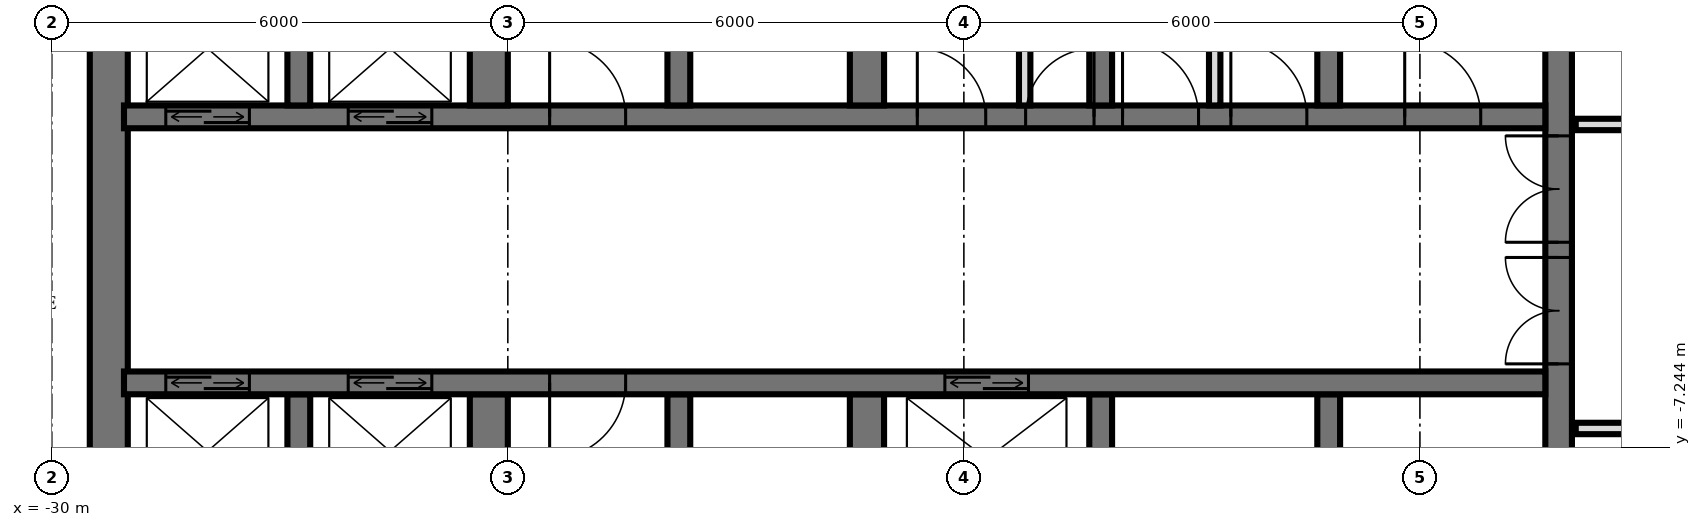
"""IFC4 building model, lengths in metres.
Left out: names, types, materials, properties, quantities, classifications, styles, units other than length and angle.
Written with IfcOpenShell. Run it as: python <this file> out.ifc"""

import sys

from ifc_helpers import new_model, si_unit, direction, frame, frame_2d, origin, place, context, subcontext, project, spatial, rectangle, extrude, element, fill, save


model = new_model("IFC4")
c1 = context("Model", 3, precision=1e-05, world=origin(), true_north=direction((0.0, 1.0)))
c2 = subcontext(c1, "Body", "Model", "MODEL_VIEW")
j1 = project(units=[si_unit("LENGTHUNIT", "METRE"), si_unit("PLANEANGLEUNIT", "RADIAN")], contexts=[c1])
p1 = place(None, origin())
s1 = spatial("IfcSite", under=j1, at=p1, CompositionType="ELEMENT")
p2 = place(p1, origin())
s2 = spatial("IfcBuilding", under=s1, at=p2, CompositionType="ELEMENT")
p3 = place(p2, frame((0.0, 0.0, 34.8)))
s3 = spatial("IfcBuildingStorey", under=s2, at=p3, CompositionType="ELEMENT", Elevation=34.8)
p4 = place(p3, frame((-10.175, -14.55, 0.0), z_axis=(0.0, 0.0, 1.0), x_axis=(0.0, 1.0, 0.0)))
e1 = element("IfcWall", 1, at=p4, inside=s3, PredefinedType="SHEAR", context=c2, shape_type="SweptSolid", body=[
    extrude(rectangle(XDim=14.1, YDim=0.35, at=frame_2d((7.05, 0.0))), origin(), (0.0, 0.0, 1.0), 3.6),
])
p5 = place(p4, frame((8.4, 0.0, 0.0)))
e2 = element("IfcOpeningElement", 2, at=p5, cuts=e1, PredefinedType="OPENING", context=c2, shape_type="SweptSolid", body=[
    extrude(rectangle(XDim=1.4, YDim=2.4, at=frame_2d((0.7, 1.2))), frame((0.0, 0.185, 0.0), z_axis=(0.0, -1.0, 0.0), x_axis=(1.0, 0.0, 0.0)), (0.0, 0.0, 1.0), 0.37),
])
p6 = place(p4, frame((10.0, 0.0, 0.0)))
e3 = element("IfcOpeningElement", 3, at=p6, cuts=e1, PredefinedType="OPENING", context=c2, shape_type="SweptSolid", body=[
    extrude(rectangle(XDim=1.4, YDim=2.4, at=frame_2d((0.7, 1.2))), frame((0.0, 0.185, 0.0), z_axis=(0.0, -1.0, 0.0), x_axis=(1.0, 0.0, 0.0)), (0.0, 0.0, 1.0), 0.37),
])
p7 = place(p4, frame((4.0, 0.0, 0.0)))
e4 = element("IfcOpeningElement", 4, at=p7, cuts=e1, PredefinedType="OPENING", context=c2, shape_type="SweptSolid", body=[
    extrude(rectangle(XDim=1.2, YDim=2.1, at=frame_2d((0.6, 1.05))), frame((0.0, 0.185, 0.0), z_axis=(0.0, -1.0, 0.0), x_axis=(1.0, 0.0, 0.0)), (0.0, 0.0, 1.0), 0.37),
])
p8 = place(p3, frame((-29.25, -14.55, 0.0), z_axis=(0.0, 0.0, 1.0), x_axis=(0.0, 1.0, 0.0)))
e5 = element("IfcWall", 5, at=p8, inside=s3, PredefinedType="SHEAR", context=c2, shape_type="SweptSolid", body=[
    extrude(rectangle(XDim=14.1, YDim=0.5, at=frame_2d((7.05, 0.0))), origin(), (0.0, 0.0, 1.0), 3.6),
])
p9 = place(p3, frame((-29.05, -2.9, 0.0), z_axis=(0.0, 0.0, 1.0), x_axis=(1.0, 0.0, 0.0)))
e6 = element("IfcWall", 6, at=p9, inside=s3, PredefinedType="SHEAR", context=c2, shape_type="SweptSolid", body=[
    extrude(rectangle(XDim=18.7, YDim=0.3, at=frame_2d((9.35, 0.0))), origin(), (0.0, 0.0, 1.0), 3.6),
])
p10 = place(p9, frame((2.95, 0.0, 0.0)))
e7 = element("IfcOpeningElement", 7, at=p10, cuts=e6, PredefinedType="OPENING", context=c2, shape_type="SweptSolid", body=[
    extrude(rectangle(XDim=1.1, YDim=2.1, at=frame_2d((0.55, 1.05))), frame((0.0, 0.16, 0.0), z_axis=(0.0, -1.0, 0.0), x_axis=(1.0, 0.0, 0.0)), (0.0, 0.0, 1.0), 0.32),
])
p11 = place(p9, frame((0.55, 0.0, 0.0)))
e8 = element("IfcOpeningElement", 8, at=p11, cuts=e6, PredefinedType="OPENING", context=c2, shape_type="SweptSolid", body=[
    extrude(rectangle(XDim=1.1, YDim=2.1, at=frame_2d((0.55, 1.05))), frame((0.0, 0.16, 0.0), z_axis=(0.0, -1.0, 0.0), x_axis=(1.0, 0.0, 0.0)), (0.0, 0.0, 1.0), 0.32),
])
p12 = place(p9, frame((11.863, 0.0, 0.0)))
e9 = element("IfcOpeningElement", 9, at=p12, cuts=e6, PredefinedType="OPENING", context=c2, shape_type="SweptSolid", body=[
    extrude(rectangle(XDim=0.9, YDim=2.1, at=frame_2d((0.45, 1.05))), frame((0.0, 0.16, 0.0), z_axis=(0.0, -1.0, 0.0), x_axis=(1.0, 0.0, 0.0)), (0.0, 0.0, 1.0), 0.32),
])
p13 = place(p9, frame((10.438, 0.0, 0.0)))
e10 = element("IfcOpeningElement", 10, at=p13, cuts=e6, PredefinedType="OPENING", context=c2, shape_type="SweptSolid", body=[
    extrude(rectangle(XDim=0.9, YDim=2.1, at=frame_2d((0.45, 1.05))), frame((0.0, 0.16, 0.0), z_axis=(0.0, -1.0, 0.0), x_axis=(1.0, 0.0, 0.0)), (0.0, 0.0, 1.0), 0.32),
])
p14 = place(p9, frame((16.85, 0.0, 0.0)))
e11 = element("IfcOpeningElement", 11, at=p14, cuts=e6, PredefinedType="OPENING", context=c2, shape_type="SweptSolid", body=[
    extrude(rectangle(XDim=1.0, YDim=2.1, at=frame_2d((0.5, 1.05))), frame((0.0, 0.16, 0.0), z_axis=(0.0, -1.0, 0.0), x_axis=(1.0, 0.0, 0.0)), (0.0, 0.0, 1.0), 0.32),
])
p15 = place(p9, frame((14.562, 0.0, 0.0)))
e12 = element("IfcOpeningElement", 12, at=p15, cuts=e6, PredefinedType="OPENING", context=c2, shape_type="SweptSolid", body=[
    extrude(rectangle(XDim=1.0, YDim=2.1, at=frame_2d((0.5, 1.05))), frame((0.0, 0.16, 0.0), z_axis=(0.0, -1.0, 0.0), x_axis=(1.0, 0.0, 0.0)), (0.0, 0.0, 1.0), 0.32),
])
p16 = place(p9, frame((13.137, 0.0, 0.0)))
e13 = element("IfcOpeningElement", 13, at=p16, cuts=e6, PredefinedType="OPENING", context=c2, shape_type="SweptSolid", body=[
    extrude(rectangle(XDim=1.0, YDim=2.1, at=frame_2d((0.5, 1.05))), frame((0.0, 0.16, 0.0), z_axis=(0.0, -1.0, 0.0), x_axis=(1.0, 0.0, 0.0)), (0.0, 0.0, 1.0), 0.32),
])
p17 = place(p9, frame((5.6, 0.0, 0.0)))
e14 = element("IfcOpeningElement", 14, at=p17, cuts=e6, PredefinedType="OPENING", context=c2, shape_type="SweptSolid", body=[
    extrude(rectangle(XDim=1.0, YDim=2.1, at=frame_2d((0.5, 1.05))), frame((0.0, 0.16, 0.0), z_axis=(0.0, -1.0, 0.0), x_axis=(1.0, 0.0, 0.0)), (0.0, 0.0, 1.0), 0.32),
])
p18 = place(p3, frame((-29.05, -6.4, 0.0), z_axis=(0.0, 0.0, 1.0), x_axis=(1.0, 0.0, 0.0)))
e15 = element("IfcWall", 15, at=p18, inside=s3, PredefinedType="SHEAR", context=c2, shape_type="SweptSolid", body=[
    extrude(rectangle(XDim=18.7, YDim=0.3, at=frame_2d((9.35, 0.0))), origin(), (0.0, 0.0, 1.0), 3.6),
])
p19 = place(p18, frame((2.95, 0.0, 0.0)))
e16 = element("IfcOpeningElement", 16, at=p19, cuts=e15, PredefinedType="OPENING", context=c2, shape_type="SweptSolid", body=[
    extrude(rectangle(XDim=1.1, YDim=2.1, at=frame_2d((0.55, 1.05))), frame((0.0, 0.16, 0.0), z_axis=(0.0, -1.0, 0.0), x_axis=(1.0, 0.0, 0.0)), (0.0, 0.0, 1.0), 0.32),
])
p20 = place(p18, frame((0.55, 0.0, 0.0)))
e17 = element("IfcOpeningElement", 17, at=p20, cuts=e15, PredefinedType="OPENING", context=c2, shape_type="SweptSolid", body=[
    extrude(rectangle(XDim=1.1, YDim=2.1, at=frame_2d((0.55, 1.05))), frame((0.0, 0.16, 0.0), z_axis=(0.0, -1.0, 0.0), x_axis=(1.0, 0.0, 0.0)), (0.0, 0.0, 1.0), 0.32),
])
p21 = place(p18, frame((10.8, 0.0, 0.0)))
e18 = element("IfcOpeningElement", 18, at=p21, cuts=e15, PredefinedType="OPENING", context=c2, shape_type="SweptSolid", body=[
    extrude(rectangle(XDim=1.1, YDim=2.1, at=frame_2d((0.55, 1.05))), frame((0.0, 0.16, 0.0), z_axis=(0.0, -1.0, 0.0), x_axis=(1.0, 0.0, 0.0)), (0.0, 0.0, 1.0), 0.32),
])
p22 = place(p18, frame((5.6, 0.0, 0.0)))
e19 = element("IfcOpeningElement", 19, at=p22, cuts=e15, PredefinedType="OPENING", context=c2, shape_type="SweptSolid", body=[
    extrude(rectangle(XDim=1.0, YDim=2.1, at=frame_2d((0.5, 1.05))), frame((0.0, 0.16, 0.0), z_axis=(0.0, -1.0, 0.0), x_axis=(1.0, 0.0, 0.0)), (0.0, 0.0, 1.0), 0.32),
])
for number, where, z_axis, x_axis in (
    (20, (-13.2, -2.75, 0.0), (0.0, 0.0, 1.0), (0.0, 1.0, 0.0)),
    (21, (-13.2, -8.85, 0.0), (0.0, 0.0, 1.0), (0.0, 1.0, 0.0)),
    (22, (-16.2, -2.75, 0.0), (0.0, 0.0, 1.0), (0.0, 1.0, 0.0)),
    (23, (-16.2, -8.85, 0.0), (0.0, 0.0, 1.0), (0.0, 1.0, 0.0)),
):
    element("IfcWall", number, at=place(p3, frame(where, z_axis=z_axis, x_axis=x_axis)), inside=s3, PredefinedType="SHEAR", context=c2, shape_type="SweptSolid", body=[
        extrude(rectangle(XDim=2.3, YDim=0.3, at=frame_2d((1.15, 0.0))), origin(), (0.0, 0.0, 1.0), 3.6),
    ])
for number, where, z_axis, x_axis in (
    (24, (-19.275, -2.75, 0.0), (0.0, 0.0, 1.0), (0.0, 1.0, 0.0)),
    (25, (-19.275, -8.85, 0.0), (0.0, 0.0, 1.0), (0.0, 1.0, 0.0)),
):
    element("IfcWall", number, at=place(p3, frame(where, z_axis=z_axis, x_axis=x_axis)), inside=s3, PredefinedType="SHEAR", context=c2, shape_type="SweptSolid", body=[
        extrude(rectangle(XDim=2.3, YDim=0.45, at=frame_2d((1.15, 0.0))), origin(), (0.0, 0.0, 1.0), 3.6),
    ])
for number, where, z_axis, x_axis in (
    (26, (-21.75, -2.75, 0.0), (0.0, 0.0, 1.0), (0.0, 1.0, 0.0)),
    (27, (-21.75, -8.85, 0.0), (0.0, 0.0, 1.0), (0.0, 1.0, 0.0)),
):
    element("IfcWall", number, at=place(p3, frame(where, z_axis=z_axis, x_axis=x_axis)), inside=s3, PredefinedType="SHEAR", context=c2, shape_type="SweptSolid", body=[
        extrude(rectangle(XDim=2.3, YDim=0.3, at=frame_2d((1.15, 0.0))), origin(), (0.0, 0.0, 1.0), 3.6),
    ])
for number, where, z_axis, x_axis in (
    (28, (-24.25, -2.75, 0.0), (0.0, 0.0, 1.0), (0.0, 1.0, 0.0)),
    (29, (-24.25, -8.85, 0.0), (0.0, 0.0, 1.0), (0.0, 1.0, 0.0)),
):
    element("IfcWall", number, at=place(p3, frame(where, z_axis=z_axis, x_axis=x_axis)), inside=s3, PredefinedType="SHEAR", context=c2, shape_type="SweptSolid", body=[
        extrude(rectangle(XDim=2.3, YDim=0.5, at=frame_2d((1.15, 0.0))), origin(), (0.0, 0.0, 1.0), 3.6),
    ])
for number, where, z_axis, x_axis in (
    (30, (-26.75, -2.75, 0.0), (0.0, 0.0, 1.0), (0.0, 1.0, 0.0)),
    (31, (-26.75, -8.85, 0.0), (0.0, 0.0, 1.0), (0.0, 1.0, 0.0)),
):
    element("IfcWall", number, at=place(p3, frame(where, z_axis=z_axis, x_axis=x_axis)), inside=s3, PredefinedType="SHEAR", context=c2, shape_type="SweptSolid", body=[
        extrude(rectangle(XDim=2.3, YDim=0.3, at=frame_2d((1.15, 0.0))), origin(), (0.0, 0.0, 1.0), 3.6),
    ])
for number, where, z_axis, x_axis in (
    (32, (-17.2, -2.75, 0.0), (0.0, 0.0, 1.0), (0.0, 1.0, 0.0)),
    (33, (-14.7, -2.75, 0.0), (0.0, 0.0, 1.0), (0.0, 1.0, 0.0)),
):
    element("IfcWall", number, at=place(p3, frame(where, z_axis=z_axis, x_axis=x_axis)), inside=s3, PredefinedType="PARTITIONING", context=c2, shape_type="SweptSolid", body=[
        extrude(rectangle(XDim=2.3, YDim=0.15, at=frame_2d((1.15, 0.0))), origin(), (0.0, 0.0, 1.0), 3.3),
    ])
p23 = place(p3, frame((-9.95, -7.0, 0.0), z_axis=(0.0, 0.0, 1.0), x_axis=(1.0, 0.0, 0.0)))
e34 = element("IfcWall", 34, at=p23, inside=s3, PredefinedType="PARTITIONING", context=c2, shape_type="SweptSolid", body=[
    extrude(rectangle(XDim=19.9, YDim=0.15, at=frame_2d((9.95, 0.0))), origin(), (0.0, 0.0, 1.0), 3.32),
])
p24 = place(p23, frame((9.45, 0.0, 0.0)))
e35 = element("IfcOpeningElement", 35, at=p24, cuts=e34, PredefinedType="OPENING", context=c2, shape_type="SweptSolid", body=[
    extrude(rectangle(XDim=1.0, YDim=2.1, at=frame_2d((0.5, 1.05))), frame((0.0, 0.085, 0.0), z_axis=(0.0, -1.0, 0.0), x_axis=(1.0, 0.0, 0.0)), (0.0, 0.0, 1.0), 0.17),
])
p25 = place(p23, frame((15.45, 0.0, 0.0)))
e36 = element("IfcOpeningElement", 36, at=p25, cuts=e34, PredefinedType="OPENING", context=c2, shape_type="SweptSolid", body=[
    extrude(rectangle(XDim=1.0, YDim=2.1, at=frame_2d((0.5, 1.05))), frame((0.0, 0.085, 0.0), z_axis=(0.0, -1.0, 0.0), x_axis=(1.0, 0.0, 0.0)), (0.0, 0.0, 1.0), 0.17),
])
p26 = place(p3, frame((-9.95, -3.0, 0.0), z_axis=(0.0, 0.0, 1.0), x_axis=(1.0, 0.0, 0.0)))
e37 = element("IfcWall", 37, at=p26, inside=s3, PredefinedType="PARTITIONING", context=c2, shape_type="SweptSolid", body=[
    extrude(rectangle(XDim=19.9, YDim=0.15, at=frame_2d((9.95, 0.0))), origin(), (0.0, 0.0, 1.0), 3.32),
])
p27 = place(p26, frame((1.7, 0.0, 0.0)))
e38 = element("IfcOpeningElement", 38, at=p27, cuts=e37, PredefinedType="OPENING", context=c2, shape_type="SweptSolid", body=[
    extrude(rectangle(XDim=1.0, YDim=2.1, at=frame_2d((0.5, 1.05))), frame((0.0, 0.085, 0.0), z_axis=(0.0, -1.0, 0.0), x_axis=(1.0, 0.0, 0.0)), (0.0, 0.0, 1.0), 0.17),
])
p28 = place(p26, frame((5.45, 0.0, 0.0)))
e39 = element("IfcOpeningElement", 39, at=p28, cuts=e37, PredefinedType="OPENING", context=c2, shape_type="SweptSolid", body=[
    extrude(rectangle(XDim=1.0, YDim=2.1, at=frame_2d((0.5, 1.05))), frame((0.0, 0.085, 0.0), z_axis=(0.0, -1.0, 0.0), x_axis=(1.0, 0.0, 0.0)), (0.0, 0.0, 1.0), 0.17),
])
p29 = place(p26, frame((8.2, 0.0, 0.0)))
e40 = element("IfcOpeningElement", 40, at=p29, cuts=e37, PredefinedType="OPENING", context=c2, shape_type="SweptSolid", body=[
    extrude(rectangle(XDim=1.0, YDim=2.1, at=frame_2d((0.5, 1.05))), frame((0.0, 0.085, 0.0), z_axis=(0.0, -1.0, 0.0), x_axis=(1.0, 0.0, 0.0)), (0.0, 0.0, 1.0), 0.17),
])
p30 = place(p26, frame((11.95, 0.0, 0.0)))
e41 = element("IfcOpeningElement", 41, at=p30, cuts=e37, PredefinedType="OPENING", context=c2, shape_type="SweptSolid", body=[
    extrude(rectangle(XDim=1.0, YDim=2.1, at=frame_2d((0.5, 1.05))), frame((0.0, 0.085, 0.0), z_axis=(0.0, -1.0, 0.0), x_axis=(1.0, 0.0, 0.0)), (0.0, 0.0, 1.0), 0.17),
])
p31 = place(p26, frame((16.95, 0.0, 0.0)))
e42 = element("IfcOpeningElement", 42, at=p31, cuts=e37, PredefinedType="OPENING", context=c2, shape_type="SweptSolid", body=[
    extrude(rectangle(XDim=1.0, YDim=2.1, at=frame_2d((0.5, 1.05))), frame((0.0, 0.085, 0.0), z_axis=(0.0, -1.0, 0.0), x_axis=(1.0, 0.0, 0.0)), (0.0, 0.0, 1.0), 0.17),
])
p32 = place(p10, origin())
e43 = element("IfcDoor", 43, at=p32, inside=s3, OperationType="DOUBLE_DOOR_SLIDING", PredefinedType="USERDEFINED", context=c2, shape_type="SweptSolid", body=[
    extrude(rectangle(XDim=1.1, YDim=2.1, at=frame_2d((0.55, 1.05))), frame((0.0, 0.025, 0.0), z_axis=(0.0, -1.0, 0.0), x_axis=(1.0, 0.0, 0.0)), (0.0, 0.0, 1.0), 0.05),
])
fill(e7, e43)
p33 = place(p11, origin())
e44 = element("IfcDoor", 44, at=p33, inside=s3, OperationType="DOUBLE_DOOR_SLIDING", PredefinedType="USERDEFINED", context=c2, shape_type="SweptSolid", body=[
    extrude(rectangle(XDim=1.1, YDim=2.1, at=frame_2d((0.55, 1.05))), frame((0.0, 0.025, 0.0), z_axis=(0.0, -1.0, 0.0), x_axis=(1.0, 0.0, 0.0)), (0.0, 0.0, 1.0), 0.05),
])
fill(e8, e44)
p34 = place(p19, origin())
e45 = element("IfcDoor", 45, at=p34, inside=s3, OperationType="DOUBLE_DOOR_SLIDING", PredefinedType="USERDEFINED", context=c2, shape_type="SweptSolid", body=[
    extrude(rectangle(XDim=1.1, YDim=2.1, at=frame_2d((0.55, 1.05))), frame((0.0, 0.025, 0.0), z_axis=(0.0, -1.0, 0.0), x_axis=(1.0, 0.0, 0.0)), (0.0, 0.0, 1.0), 0.05),
])
fill(e16, e45)
p35 = place(p20, origin())
e46 = element("IfcDoor", 46, at=p35, inside=s3, OperationType="DOUBLE_DOOR_SLIDING", PredefinedType="USERDEFINED", context=c2, shape_type="SweptSolid", body=[
    extrude(rectangle(XDim=1.1, YDim=2.1, at=frame_2d((0.55, 1.05))), frame((0.0, 0.025, 0.0), z_axis=(0.0, -1.0, 0.0), x_axis=(1.0, 0.0, 0.0)), (0.0, 0.0, 1.0), 0.05),
])
fill(e17, e46)
p36 = place(p21, origin())
e47 = element("IfcDoor", 47, at=p36, inside=s3, OperationType="DOUBLE_DOOR_SLIDING", PredefinedType="USERDEFINED", context=c2, shape_type="SweptSolid", body=[
    extrude(rectangle(XDim=1.1, YDim=2.1, at=frame_2d((0.55, 1.05))), frame((0.0, 0.025, 0.0), z_axis=(0.0, -1.0, 0.0), x_axis=(1.0, 0.0, 0.0)), (0.0, 0.0, 1.0), 0.05),
])
fill(e18, e47)
p37 = place(p5, origin())
e48 = element("IfcDoor", 48, at=p37, inside=s3, OperationType="DOUBLE_DOOR_SINGLE_SWING", PredefinedType="DOOR", context=c2, shape_type="SweptSolid", body=[
    extrude(rectangle(XDim=1.4, YDim=2.4, at=frame_2d((0.7, 1.2))), frame((0.0, 0.025, 0.0), z_axis=(0.0, -1.0, 0.0), x_axis=(1.0, 0.0, 0.0)), (0.0, 0.0, 1.0), 0.05),
])
fill(e2, e48)
p38 = place(p6, origin())
e49 = element("IfcDoor", 49, at=p38, inside=s3, OperationType="DOUBLE_DOOR_SINGLE_SWING", PredefinedType="DOOR", context=c2, shape_type="SweptSolid", body=[
    extrude(rectangle(XDim=1.4, YDim=2.4, at=frame_2d((0.7, 1.2))), frame((0.0, 0.025, 0.0), z_axis=(0.0, -1.0, 0.0), x_axis=(1.0, 0.0, 0.0)), (0.0, 0.0, 1.0), 0.05),
])
fill(e3, e49)
p39 = place(p12, origin())
e50 = element("IfcDoor", 50, at=p39, inside=s3, OperationType="SINGLE_SWING_LEFT", PredefinedType="DOOR", context=c2, shape_type="SweptSolid", body=[
    extrude(rectangle(XDim=0.9, YDim=2.1, at=frame_2d((0.45, 1.05))), frame((0.0, 0.025, 0.0), z_axis=(0.0, -1.0, 0.0), x_axis=(1.0, 0.0, 0.0)), (0.0, 0.0, 1.0), 0.05),
])
fill(e9, e50)
p40 = place(p13, origin())
e51 = element("IfcDoor", 51, at=p40, inside=s3, OperationType="SINGLE_SWING_RIGHT", PredefinedType="DOOR", context=c2, shape_type="SweptSolid", body=[
    extrude(rectangle(XDim=0.9, YDim=2.1, at=frame_2d((0.45, 1.05))), frame((0.0, 0.025, 0.0), z_axis=(0.0, -1.0, 0.0), x_axis=(1.0, 0.0, 0.0)), (0.0, 0.0, 1.0), 0.05),
])
fill(e10, e51)
p41 = place(p14, origin())
e52 = element("IfcDoor", 52, at=p41, inside=s3, OperationType="SINGLE_SWING_RIGHT", PredefinedType="DOOR", context=c2, shape_type="SweptSolid", body=[
    extrude(rectangle(XDim=1.0, YDim=2.1, at=frame_2d((0.5, 1.05))), frame((0.0, 0.025, 0.0), z_axis=(0.0, -1.0, 0.0), x_axis=(1.0, 0.0, 0.0)), (0.0, 0.0, 1.0), 0.05),
])
fill(e11, e52)
p42 = place(p15, origin())
e53 = element("IfcDoor", 53, at=p42, inside=s3, OperationType="SINGLE_SWING_RIGHT", PredefinedType="DOOR", context=c2, shape_type="SweptSolid", body=[
    extrude(rectangle(XDim=1.0, YDim=2.1, at=frame_2d((0.5, 1.05))), frame((0.0, 0.025, 0.0), z_axis=(0.0, -1.0, 0.0), x_axis=(1.0, 0.0, 0.0)), (0.0, 0.0, 1.0), 0.05),
])
fill(e12, e53)
p43 = place(p16, origin())
e54 = element("IfcDoor", 54, at=p43, inside=s3, OperationType="SINGLE_SWING_RIGHT", PredefinedType="DOOR", context=c2, shape_type="SweptSolid", body=[
    extrude(rectangle(XDim=1.0, YDim=2.1, at=frame_2d((0.5, 1.05))), frame((0.0, 0.025, 0.0), z_axis=(0.0, -1.0, 0.0), x_axis=(1.0, 0.0, 0.0)), (0.0, 0.0, 1.0), 0.05),
])
fill(e13, e54)
p44 = place(p17, origin())
e55 = element("IfcDoor", 55, at=p44, inside=s3, OperationType="SINGLE_SWING_RIGHT", PredefinedType="DOOR", context=c2, shape_type="SweptSolid", body=[
    extrude(rectangle(XDim=1.0, YDim=2.1, at=frame_2d((0.5, 1.05))), frame((0.0, 0.025, 0.0), z_axis=(0.0, -1.0, 0.0), x_axis=(1.0, 0.0, 0.0)), (0.0, 0.0, 1.0), 0.05),
])
fill(e14, e55)
p45 = place(p22, frame((0.5, 0.0, 0.0), z_axis=(0.0, 0.0, 1.0), x_axis=(-1.0, 0.0, 0.0)))
e56 = element("IfcDoor", 56, at=p45, inside=s3, OperationType="SINGLE_SWING_LEFT", PredefinedType="DOOR", context=c2, shape_type="SweptSolid", body=[
    extrude(rectangle(XDim=1.0, YDim=2.1, at=frame_2d((0.0, 1.05))), frame((0.0, -0.025, 0.0), z_axis=(0.0, 1.0, 0.0), x_axis=(-1.0, 0.0, 0.0)), (0.0, 0.0, 1.0), 0.05),
])
fill(e19, e56)
save(model, sys.argv[1])
